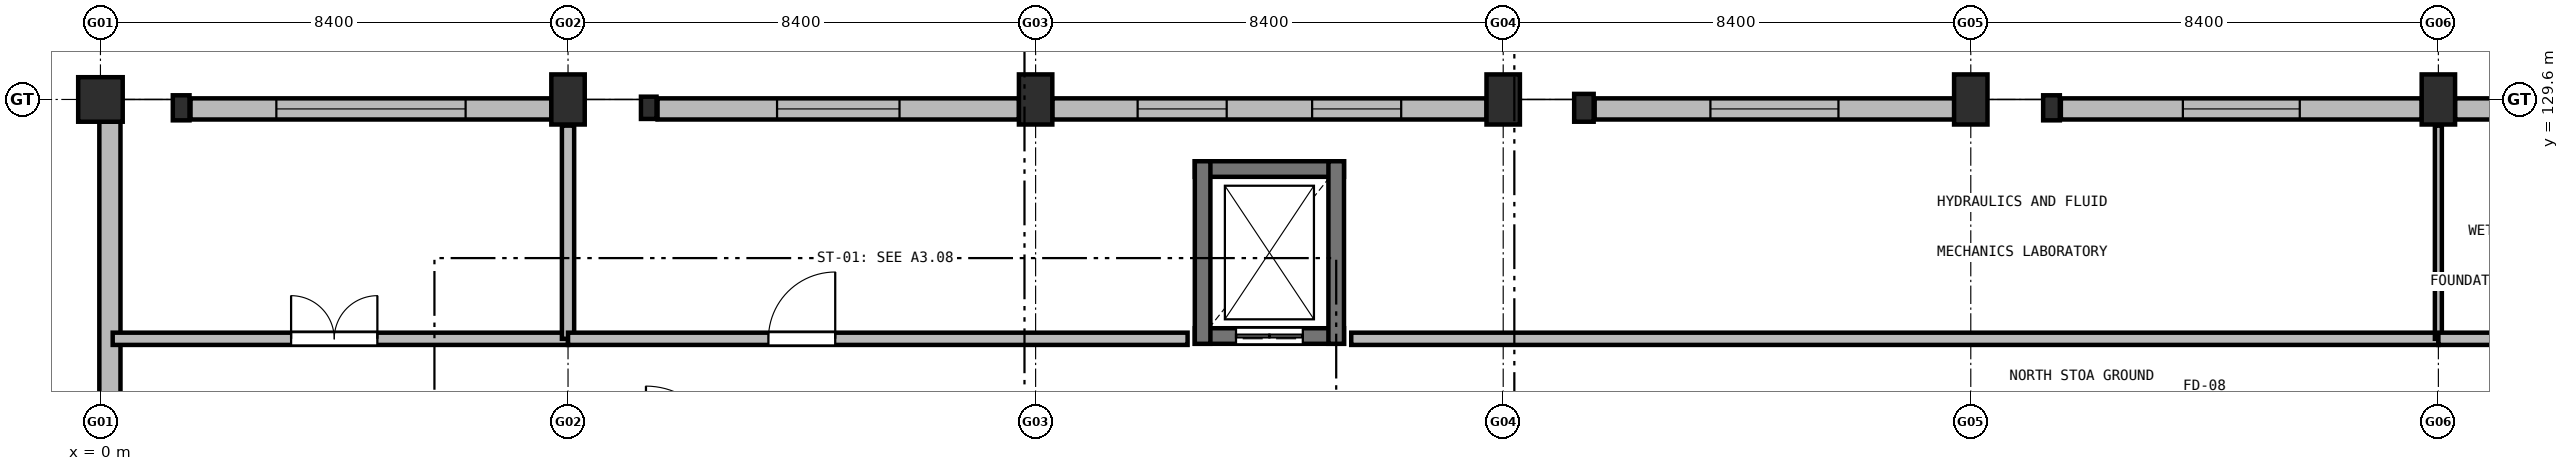
"""IFC4 building model, lengths in metres.
Left out: names, types, materials, properties, quantities, classifications, styles, units other than length and angle.
Written with IfcOpenShell. Run it as: python <this file> out.ifc"""

import sys

from ifc_helpers import new_model, si_unit, direction, frame, frame_2d, origin, origin_2d, place, context, subcontext, project, spatial, rectangle, extrude, element, fill, save


model = new_model("IFC4")
c1 = context("Model", 3, precision=1e-05, world=origin(), true_north=direction((0.0, 1.0)))
c2 = subcontext(c1, "Body", "Model", "MODEL_VIEW")
j1 = project(units=[si_unit("LENGTHUNIT", "METRE"), si_unit("PLANEANGLEUNIT", "RADIAN")], contexts=[c1])
p1 = place(None, origin())
s1 = spatial("IfcSite", under=j1, at=p1, CompositionType="ELEMENT")
p2 = place(p1, origin())
s2 = spatial("IfcBuilding", under=s1, at=p2, CompositionType="ELEMENT")
p3 = place(p2, origin())
s3 = spatial("IfcBuildingStorey", under=s2, at=p3, CompositionType="ELEMENT", Elevation=0.0)
p4 = place(p3, frame((0.0, 129.6, 0.0), z_axis=(0.0, 0.0, 1.0), x_axis=(1.0, 0.0, 0.0)))
e1 = element("IfcColumn", 1, at=p4, inside=s3, PredefinedType="COLUMN", context=c2, shape_type="SweptSolid", body=[
    extrude(rectangle(XDim=0.8, YDim=0.8, at=origin_2d()), origin(), (0.0, 0.0, 1.0), 5.1),
])
for number, where, z_axis, x_axis in (
    (2, (8.4, 129.6, 0.0), (0.0, 0.0, 1.0), (1.0, 0.0, 0.0)),
    (3, (16.8, 129.6, 0.0), (0.0, 0.0, 1.0), (1.0, 0.0, 0.0)),
    (4, (25.2, 129.6, 0.0), (0.0, 0.0, 1.0), (1.0, 0.0, 0.0)),
    (5, (33.6, 129.6, 0.0), (0.0, 0.0, 1.0), (1.0, 0.0, 0.0)),
    (6, (42.0, 129.6, 0.0), (0.0, 0.0, 1.0), (1.0, 0.0, 0.0)),
):
    element("IfcColumn", number, at=place(p3, frame(where, z_axis=z_axis, x_axis=x_axis)), inside=s3, PredefinedType="COLUMN", context=c2, shape_type="SweptSolid", body=[
        extrude(rectangle(XDim=0.6, YDim=0.9, at=origin_2d()), origin(), (0.0, 0.0, 1.0), 5.1),
    ])
p5 = place(p3, frame((1.45, 129.45, 0.0), z_axis=(0.0, 0.0, 1.0), x_axis=(1.0, 0.0, 0.0)))
e7 = element("IfcColumn", 7, at=p5, inside=s3, PredefinedType="PILASTER", context=c2, shape_type="SweptSolid", body=[
    extrude(rectangle(XDim=0.3, YDim=0.45, at=origin_2d()), origin(), (0.0, 0.0, 1.0), 4.15),
])
p6 = place(p3, frame((9.85, 129.45, 0.0), z_axis=(0.0, 0.0, 1.0), x_axis=(1.0, 0.0, 0.0)))
e8 = element("IfcColumn", 8, at=p6, inside=s3, PredefinedType="PILASTER", context=c2, shape_type="SweptSolid", body=[
    extrude(rectangle(XDim=0.28, YDim=0.4, at=origin_2d()), origin(), (0.0, 0.0, 1.0), 4.15),
])
p7 = place(p3, frame((26.65, 129.45, 0.0), z_axis=(0.0, 0.0, 1.0), x_axis=(1.0, 0.0, 0.0)))
e9 = element("IfcColumn", 9, at=p7, inside=s3, PredefinedType="PILASTER", context=c2, shape_type="SweptSolid", body=[
    extrude(rectangle(XDim=0.35, YDim=0.5, at=origin_2d()), origin(), (0.0, 0.0, 1.0), 4.15),
])
p8 = place(p3, frame((35.05, 129.45, 0.0), z_axis=(0.0, 0.0, 1.0), x_axis=(1.0, 0.0, 0.0)))
e10 = element("IfcColumn", 10, at=p8, inside=s3, PredefinedType="PILASTER", context=c2, shape_type="SweptSolid", body=[
    extrude(rectangle(XDim=0.3, YDim=0.45, at=origin_2d()), origin(), (0.0, 0.0, 1.0), 4.15),
])
p9 = place(p3, frame((0.17, 122.798, 0.0), z_axis=(0.0, 0.0, 1.0), x_axis=(0.0, 1.0, 0.0)))
e11 = element("IfcWall", 11, at=p9, inside=s3, PredefinedType="SOLIDWALL", context=c2, shape_type="SweptSolid", body=[
    extrude(rectangle(XDim=6.404, YDim=0.38, at=frame_2d((3.202, 0.0))), origin(), (0.0, 0.0, 1.0), 4.11),
])
p10 = place(p3, frame((1.618, 129.43, 0.0), z_axis=(0.0, 0.0, 1.0), x_axis=(1.0, 0.0, 0.0)))
e12 = element("IfcWall", 12, at=p10, inside=s3, PredefinedType="SOLIDWALL", context=c2, shape_type="SweptSolid", body=[
    extrude(rectangle(XDim=6.484, YDim=0.38, at=frame_2d((3.242, 0.0))), origin(), (0.0, 0.0, 1.0), 4.01),
])
p11 = place(p10, frame((1.542, 0.0, 0.95)))
e13 = element("IfcOpeningElement", 13, at=p11, cuts=e12, PredefinedType="OPENING", context=c2, shape_type="SweptSolid", body=[
    extrude(rectangle(XDim=3.4, YDim=1.8, at=frame_2d((1.7, 0.9))), frame((0.0, 0.2, 0.0), z_axis=(0.0, -1.0, 0.0), x_axis=(1.0, 0.0, 0.0)), (0.0, 0.0, 1.0), 0.4),
])
p12 = place(p3, frame((10.008, 129.43, 0.0), z_axis=(0.0, 0.0, 1.0), x_axis=(1.0, 0.0, 0.0)))
e14 = element("IfcWall", 14, at=p12, inside=s3, PredefinedType="SOLIDWALL", context=c2, shape_type="SweptSolid", body=[
    extrude(rectangle(XDim=6.494, YDim=0.38, at=frame_2d((3.247, 0.0))), origin(), (0.0, 0.0, 1.0), 4.01),
])
p13 = place(p12, frame((2.147, 0.0, 0.95)))
e15 = element("IfcOpeningElement", 15, at=p13, cuts=e14, PredefinedType="OPENING", context=c2, shape_type="SweptSolid", body=[
    extrude(rectangle(XDim=2.2, YDim=1.7, at=frame_2d((1.1, 0.85))), frame((0.0, 0.2, 0.0), z_axis=(0.0, -1.0, 0.0), x_axis=(1.0, 0.0, 0.0)), (0.0, 0.0, 1.0), 0.4),
])
p14 = place(p3, frame((17.098, 129.43, 0.0), z_axis=(0.0, 0.0, 1.0), x_axis=(1.0, 0.0, 0.0)))
e16 = element("IfcWall", 16, at=p14, inside=s3, PredefinedType="SOLIDWALL", context=c2, shape_type="SweptSolid", body=[
    extrude(rectangle(XDim=7.804, YDim=0.38, at=frame_2d((3.902, 0.0))), origin(), (0.0, 0.0, 1.0), 4.01),
])
p15 = place(p14, frame((1.535, 0.0, 0.95)))
e17 = element("IfcOpeningElement", 17, at=p15, cuts=e16, PredefinedType="OPENING", context=c2, shape_type="SweptSolid", body=[
    extrude(rectangle(XDim=1.6, YDim=1.6, at=frame_2d((0.8, 0.8))), frame((0.0, 0.2, 0.0), z_axis=(0.0, -1.0, 0.0), x_axis=(1.0, 0.0, 0.0)), (0.0, 0.0, 1.0), 0.4),
])
p16 = place(p14, frame((4.669, 0.0, 0.95)))
e18 = element("IfcOpeningElement", 18, at=p16, cuts=e16, PredefinedType="OPENING", context=c2, shape_type="SweptSolid", body=[
    extrude(rectangle(XDim=1.6, YDim=1.6, at=frame_2d((0.8, 0.8))), frame((0.0, 0.2, 0.0), z_axis=(0.0, -1.0, 0.0), x_axis=(1.0, 0.0, 0.0)), (0.0, 0.0, 1.0), 0.4),
])
p17 = place(p3, frame((26.843, 129.43, 0.0), z_axis=(0.0, 0.0, 1.0), x_axis=(1.0, 0.0, 0.0)))
e19 = element("IfcWall", 19, at=p17, inside=s3, PredefinedType="SOLIDWALL", context=c2, shape_type="SweptSolid", body=[
    extrude(rectangle(XDim=6.459, YDim=0.38, at=frame_2d((3.229, 0.0))), origin(), (0.0, 0.0, 1.0), 4.01),
])
p18 = place(p17, frame((2.08, 0.0, 0.95)))
e20 = element("IfcOpeningElement", 20, at=p18, cuts=e19, PredefinedType="OPENING", context=c2, shape_type="SweptSolid", body=[
    extrude(rectangle(XDim=2.3, YDim=1.95, at=frame_2d((1.15, 0.975))), frame((0.0, 0.2, 0.0), z_axis=(0.0, -1.0, 0.0), x_axis=(1.0, 0.0, 0.0)), (0.0, 0.0, 1.0), 0.4),
])
p19 = place(p3, frame((35.218, 129.43, 0.0), z_axis=(0.0, 0.0, 1.0), x_axis=(1.0, 0.0, 0.0)))
e21 = element("IfcWall", 21, at=p19, inside=s3, PredefinedType="SOLIDWALL", context=c2, shape_type="SweptSolid", body=[
    extrude(rectangle(XDim=6.484, YDim=0.38, at=frame_2d((3.242, 0.0))), origin(), (0.0, 0.0, 1.0), 4.01),
])
p20 = place(p19, frame((2.192, 0.0, 0.95)))
e22 = element("IfcOpeningElement", 22, at=p20, cuts=e21, PredefinedType="OPENING", context=c2, shape_type="SweptSolid", body=[
    extrude(rectangle(XDim=2.1, YDim=1.85, at=frame_2d((1.05, 0.925))), frame((0.0, 0.2, 0.0), z_axis=(0.0, -1.0, 0.0), x_axis=(1.0, 0.0, 0.0)), (0.0, 0.0, 1.0), 0.4),
])
p21 = place(p3, frame((42.298, 129.43, 0.0), z_axis=(0.0, 0.0, 1.0), x_axis=(1.0, 0.0, 0.0)))
e23 = element("IfcWall", 23, at=p21, inside=s3, PredefinedType="SOLIDWALL", context=c2, shape_type="SweptSolid", body=[
    extrude(rectangle(XDim=7.804, YDim=0.38, at=frame_2d((3.902, 0.0))), origin(), (0.0, 0.0, 1.0), 4.01),
])
p22 = place(p21, frame((1.335, 0.0, 0.95)))
e24 = element("IfcOpeningElement", 24, at=p22, cuts=e23, PredefinedType="OPENING", context=c2, shape_type="SweptSolid", body=[
    extrude(rectangle(XDim=1.9, YDim=1.75, at=frame_2d((0.95, 0.875))), frame((0.0, 0.2, 0.0), z_axis=(0.0, -1.0, 0.0), x_axis=(1.0, 0.0, 0.0)), (0.0, 0.0, 1.0), 0.4),
])
p23 = place(p21, frame((4.569, 0.0, 0.95)))
e25 = element("IfcOpeningElement", 25, at=p23, cuts=e23, PredefinedType="OPENING", context=c2, shape_type="SweptSolid", body=[
    extrude(rectangle(XDim=1.9, YDim=1.75, at=frame_2d((0.95, 0.875))), frame((0.0, 0.2, 0.0), z_axis=(0.0, -1.0, 0.0), x_axis=(1.0, 0.0, 0.0)), (0.0, 0.0, 1.0), 0.4),
])
p24 = place(p3, frame((22.34, 125.35, 0.0), z_axis=(0.0, 0.0, 1.0), x_axis=(-1.0, 0.0, 0.0)))
e26 = element("IfcWall", 26, at=p24, inside=s3, PredefinedType="SHEAR", context=c2, shape_type="SweptSolid", body=[
    extrude(rectangle(XDim=2.68, YDim=0.28, at=frame_2d((1.34, 0.0))), origin(), (0.0, 0.0, 1.0), 4.82),
])
p25 = place(p24, frame((0.74, 0.0, 0.0)))
e27 = element("IfcOpeningElement", 27, at=p25, cuts=e26, PredefinedType="OPENING", context=c2, shape_type="SweptSolid", body=[
    extrude(rectangle(XDim=1.2, YDim=2.15, at=frame_2d((0.6, 1.075))), frame((0.0, 0.15, 0.0), z_axis=(0.0, -1.0, 0.0), x_axis=(1.0, 0.0, 0.0)), (0.0, 0.0, 1.0), 0.3),
])
p26 = place(p3, frame((19.66, 128.35, 0.0), z_axis=(0.0, 0.0, 1.0), x_axis=(1.0, 0.0, 0.0)))
e28 = element("IfcWall", 28, at=p26, inside=s3, PredefinedType="SHEAR", context=c2, shape_type="SweptSolid", body=[
    extrude(rectangle(XDim=2.68, YDim=0.28, at=frame_2d((1.34, 0.0))), origin(), (0.0, 0.0, 1.0), 4.82),
])
for number, where, z_axis, x_axis in (
    (29, (19.8, 125.21, 0.0), (0.0, 0.0, 1.0), (0.0, 1.0, 0.0)),
    (30, (22.2, 128.49, 0.0), (0.0, 0.0, 1.0), (0.0, -1.0, 0.0)),
):
    element("IfcWall", number, at=place(p3, frame(where, z_axis=z_axis, x_axis=x_axis)), inside=s3, PredefinedType="SHEAR", context=c2, shape_type="SweptSolid", body=[
        extrude(rectangle(XDim=3.28, YDim=0.28, at=frame_2d((1.64, 0.0))), origin(), (0.0, 0.0, 1.0), 4.82),
    ])
p27 = place(p3, frame((0.22, 125.3, 0.0), z_axis=(0.0, 0.0, 1.0), x_axis=(1.0, 0.0, 0.0)))
e31 = element("IfcWall", 31, at=p27, inside=s3, PredefinedType="SOLIDWALL", context=c2, shape_type="SweptSolid", body=[
    extrude(rectangle(XDim=8.18, YDim=0.22, at=frame_2d((4.09, 0.0))), origin(), (0.0, 0.0, 1.0), 4.105),
])
p28 = place(p27, frame((3.205, 0.0, 0.0)))
e32 = element("IfcOpeningElement", 32, at=p28, cuts=e31, PredefinedType="OPENING", context=c2, shape_type="SweptSolid", body=[
    extrude(rectangle(XDim=1.55, YDim=2.2, at=frame_2d((0.775, 1.1))), frame((0.0, 0.12, 0.0), z_axis=(0.0, -1.0, 0.0), x_axis=(1.0, 0.0, 0.0)), (0.0, 0.0, 1.0), 0.24),
])
p29 = place(p3, frame((8.4, 125.3, 0.0), z_axis=(0.0, 0.0, 1.0), x_axis=(0.0, 1.0, 0.0)))
e33 = element("IfcWall", 33, at=p29, inside=s3, PredefinedType="SOLIDWALL", context=c2, shape_type="SweptSolid", body=[
    extrude(rectangle(XDim=3.83, YDim=0.22, at=frame_2d((1.915, 0.0))), origin(), (0.0, 0.0, 1.0), 4.105),
])
p30 = place(p3, frame((8.4, 125.3, 0.0), z_axis=(0.0, 0.0, 1.0), x_axis=(1.0, 0.0, 0.0)))
e34 = element("IfcWall", 34, at=p30, inside=s3, PredefinedType="SOLIDWALL", context=c2, shape_type="SweptSolid", body=[
    extrude(rectangle(XDim=11.13, YDim=0.22, at=frame_2d((5.565, 0.0))), origin(), (0.0, 0.0, 1.0), 4.105),
])
p31 = place(p30, frame((3.6, 0.0, 0.0)))
e35 = element("IfcOpeningElement", 35, at=p31, cuts=e34, PredefinedType="OPENING", context=c2, shape_type="SweptSolid", body=[
    extrude(rectangle(XDim=1.2, YDim=2.15, at=frame_2d((0.6, 1.075))), frame((0.0, 0.12, 0.0), z_axis=(0.0, -1.0, 0.0), x_axis=(1.0, 0.0, 0.0)), (0.0, 0.0, 1.0), 0.24),
])
p32 = place(p3, frame((22.47, 125.3, 0.0), z_axis=(0.0, 0.0, 1.0), x_axis=(1.0, 0.0, 0.0)))
e36 = element("IfcWall", 36, at=p32, inside=s3, PredefinedType="SOLIDWALL", context=c2, shape_type="SweptSolid", body=[
    extrude(rectangle(XDim=19.53, YDim=0.22, at=frame_2d((9.765, 0.0))), origin(), (0.0, 0.0, 1.0), 4.105),
])
p33 = place(p3, frame((42.0, 125.3, 0.0), z_axis=(0.0, 0.0, 1.0), x_axis=(0.0, 1.0, 0.0)))
e37 = element("IfcWall", 37, at=p33, inside=s3, PredefinedType="PARTITIONING", context=c2, shape_type="SweptSolid", body=[
    extrude(rectangle(XDim=3.83, YDim=0.125, at=frame_2d((1.915, 0.0))), origin(), (0.0, 0.0, 1.0), 4.105),
])
p34 = place(p3, frame((42.0, 125.3, 0.0), z_axis=(0.0, 0.0, 1.0), x_axis=(1.0, 0.0, 0.0)))
e38 = element("IfcWall", 38, at=p34, inside=s3, PredefinedType="SOLIDWALL", context=c2, shape_type="SweptSolid", body=[
    extrude(rectangle(XDim=11.13, YDim=0.22, at=frame_2d((5.565, 0.0))), origin(), (0.0, 0.0, 1.0), 4.105),
])
p35 = place(p34, frame((3.625, 0.0, 0.0)))
e39 = element("IfcOpeningElement", 39, at=p35, cuts=e38, PredefinedType="OPENING", context=c2, shape_type="SweptSolid", body=[
    extrude(rectangle(XDim=1.15, YDim=2.15, at=frame_2d((0.575, 1.075))), frame((0.0, 0.12, 0.0), z_axis=(0.0, -1.0, 0.0), x_axis=(1.0, 0.0, 0.0)), (0.0, 0.0, 1.0), 0.24),
])
p36 = place(p11, origin())
e40 = element("IfcWindow", 40, at=p36, inside=s3, PartitioningType="SINGLE_PANEL", PredefinedType="WINDOW", context=c2, shape_type="SweptSolid", body=[
    extrude(rectangle(XDim=3.4, YDim=1.8, at=frame_2d((1.7, 0.9))), frame((0.0, 0.03, 0.0), z_axis=(0.0, -1.0, 0.0), x_axis=(1.0, 0.0, 0.0)), (0.0, 0.0, 1.0), 0.06),
])
fill(e13, e40)
p37 = place(p13, origin())
e41 = element("IfcWindow", 41, at=p37, inside=s3, PartitioningType="SINGLE_PANEL", PredefinedType="WINDOW", context=c2, shape_type="SweptSolid", body=[
    extrude(rectangle(XDim=2.2, YDim=1.7, at=frame_2d((1.1, 0.85))), frame((0.0, 0.03, 0.0), z_axis=(0.0, -1.0, 0.0), x_axis=(1.0, 0.0, 0.0)), (0.0, 0.0, 1.0), 0.06),
])
fill(e15, e41)
p38 = place(p15, origin())
e42 = element("IfcWindow", 42, at=p38, inside=s3, PartitioningType="SINGLE_PANEL", PredefinedType="WINDOW", context=c2, shape_type="SweptSolid", body=[
    extrude(rectangle(XDim=1.6, YDim=1.6, at=frame_2d((0.8, 0.8))), frame((0.0, 0.03, 0.0), z_axis=(0.0, -1.0, 0.0), x_axis=(1.0, 0.0, 0.0)), (0.0, 0.0, 1.0), 0.06),
])
fill(e17, e42)
p39 = place(p16, origin())
e43 = element("IfcWindow", 43, at=p39, inside=s3, PartitioningType="SINGLE_PANEL", PredefinedType="WINDOW", context=c2, shape_type="SweptSolid", body=[
    extrude(rectangle(XDim=1.6, YDim=1.6, at=frame_2d((0.8, 0.8))), frame((0.0, 0.03, 0.0), z_axis=(0.0, -1.0, 0.0), x_axis=(1.0, 0.0, 0.0)), (0.0, 0.0, 1.0), 0.06),
])
fill(e18, e43)
p40 = place(p18, origin())
e44 = element("IfcWindow", 44, at=p40, inside=s3, PartitioningType="SINGLE_PANEL", PredefinedType="WINDOW", context=c2, shape_type="SweptSolid", body=[
    extrude(rectangle(XDim=2.3, YDim=1.95, at=frame_2d((1.15, 0.975))), frame((0.0, 0.03, 0.0), z_axis=(0.0, -1.0, 0.0), x_axis=(1.0, 0.0, 0.0)), (0.0, 0.0, 1.0), 0.06),
])
fill(e20, e44)
p41 = place(p20, origin())
e45 = element("IfcWindow", 45, at=p41, inside=s3, PartitioningType="SINGLE_PANEL", PredefinedType="WINDOW", context=c2, shape_type="SweptSolid", body=[
    extrude(rectangle(XDim=2.1, YDim=1.85, at=frame_2d((1.05, 0.925))), frame((0.0, 0.03, 0.0), z_axis=(0.0, -1.0, 0.0), x_axis=(1.0, 0.0, 0.0)), (0.0, 0.0, 1.0), 0.06),
])
fill(e22, e45)
p42 = place(p25, origin())
e46 = element("IfcDoor", 46, at=p42, inside=s3, OperationType="DOUBLE_DOOR_SLIDING", PredefinedType="DOOR", context=c2, shape_type="SweptSolid", body=[
    extrude(rectangle(XDim=1.2, YDim=2.15, at=frame_2d((0.6, 1.075))), frame((0.0, 0.025, 0.0), z_axis=(0.0, -1.0, 0.0), x_axis=(1.0, 0.0, 0.0)), (0.0, 0.0, 1.0), 0.05),
])
fill(e27, e46)
p43 = place(p28, origin())
e47 = element("IfcDoor", 47, at=p43, inside=s3, OperationType="DOUBLE_DOOR_SINGLE_SWING", PredefinedType="DOOR", context=c2, shape_type="SweptSolid", body=[
    extrude(rectangle(XDim=1.55, YDim=2.2, at=frame_2d((0.775, 1.1))), frame((0.0, 0.025, 0.0), z_axis=(0.0, -1.0, 0.0), x_axis=(1.0, 0.0, 0.0)), (0.0, 0.0, 1.0), 0.05),
])
fill(e32, e47)
p44 = place(p31, origin())
e48 = element("IfcDoor", 48, at=p44, inside=s3, OperationType="SINGLE_SWING_RIGHT", PredefinedType="DOOR", context=c2, shape_type="SweptSolid", body=[
    extrude(rectangle(XDim=1.2, YDim=2.15, at=frame_2d((0.6, 1.075))), frame((0.0, 0.025, 0.0), z_axis=(0.0, -1.0, 0.0), x_axis=(1.0, 0.0, 0.0)), (0.0, 0.0, 1.0), 0.05),
])
fill(e35, e48)
save(model, sys.argv[1])
